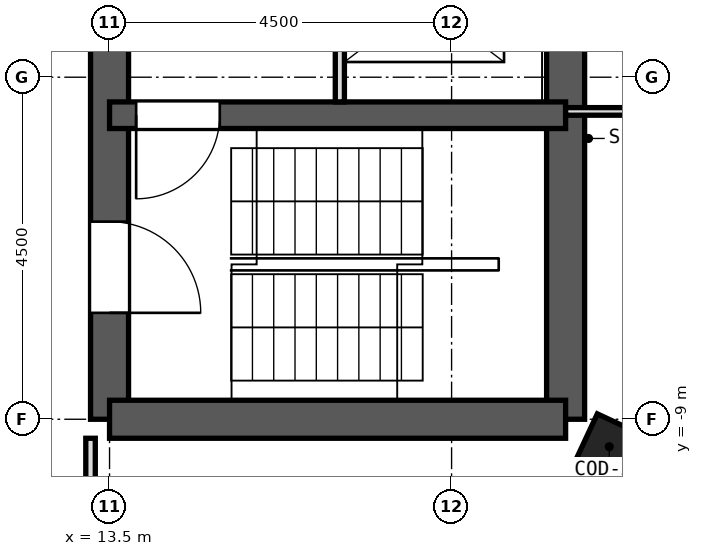
"""IFC4 building model, lengths in metres.
Left out: names, types, materials, properties, quantities, classifications, styles, units other than length and angle.
Written with IfcOpenShell. Run it as: python <this file> out.ifc"""

import sys

from ifc_helpers import new_model, si_unit, direction, frame, frame_2d, origin, origin_2d, place, context, subcontext, project, spatial, polyline, rectangle, outline, extrude, element, fill, save


model = new_model("IFC4")
c1 = context("Model", 3, precision=1e-05, world=origin(), true_north=direction((0.0, 1.0)))
c2 = subcontext(c1, "Body", "Model", "MODEL_VIEW")
j1 = project(units=[si_unit("LENGTHUNIT", "METRE"), si_unit("PLANEANGLEUNIT", "RADIAN")], contexts=[c1])
p1 = place(None, origin())
s1 = spatial("IfcSite", under=j1, at=p1, CompositionType="ELEMENT")
p2 = place(p1, origin())
s2 = spatial("IfcBuilding", under=s1, at=p2, CompositionType="ELEMENT")
p3 = place(p2, frame((0.0, 0.0, 229.7)))
s3 = spatial("IfcBuildingStorey", under=s2, at=p3, CompositionType="ELEMENT", Elevation=229.7)
p4 = place(p3, frame((20.075, -9.361, 0.0), z_axis=(0.0, 0.0, 1.0), x_axis=(0.906307787037, -0.422618261741, 0.0)))
e1 = element("IfcColumn", 1, at=p4, inside=s3, PredefinedType="COLUMN", context=c2, shape_type="SweptSolid", body=[
    extrude(rectangle(XDim=0.65, YDim=0.65, at=origin_2d()), origin(), (0.0, 0.0, 1.0), 3.3),
])
p5 = place(p3, frame((13.5, -9.0, 0.0), z_axis=(0.0, 0.0, 1.0), x_axis=(0.0, 1.0, 0.0)))
e2 = element("IfcWall", 2, at=p5, inside=s3, PredefinedType="SHEAR", context=c2, shape_type="SweptSolid", body=[
    extrude(rectangle(XDim=18.0, YDim=0.5, at=frame_2d((9.0, 0.0))), origin(), (0.0, 0.0, 1.0), 3.3),
])
p6 = place(p5, frame((15.4, 0.0, 0.0)))
e3 = element("IfcOpeningElement", 3, at=p6, cuts=e2, PredefinedType="OPENING", context=c2, shape_type="SweptSolid", body=[
    extrude(rectangle(XDim=1.2, YDim=2.1, at=frame_2d((0.6, 1.05))), frame((0.0, 0.262, 0.0), z_axis=(0.0, -1.0, 0.0), x_axis=(1.0, 0.0, 0.0)), (0.0, 0.0, 1.0), 0.524),
])
p7 = place(p5, frame((1.4, 0.0, 0.0)))
e4 = element("IfcOpeningElement", 4, at=p7, cuts=e2, PredefinedType="OPENING", context=c2, shape_type="SweptSolid", body=[
    extrude(rectangle(XDim=1.2, YDim=2.1, at=frame_2d((0.6, 1.05))), frame((0.0, 0.262, 0.0), z_axis=(0.0, -1.0, 0.0), x_axis=(1.0, 0.0, 0.0)), (0.0, 0.0, 1.0), 0.524),
])
p8 = place(p5, frame((7.5, 0.0, 0.0)))
e5 = element("IfcOpeningElement", 5, at=p8, cuts=e2, PredefinedType="OPENING", context=c2, shape_type="SweptSolid", body=[
    extrude(rectangle(XDim=3.0, YDim=2.4, at=frame_2d((1.5, 1.2))), frame((0.0, 0.262, 0.0), z_axis=(0.0, -1.0, 0.0), x_axis=(1.0, 0.0, 0.0)), (0.0, 0.0, 1.0), 0.524),
])
p9 = place(p3, frame((19.5, -9.0, 0.0), z_axis=(0.0, 0.0, 1.0), x_axis=(0.0, 1.0, 0.0)))
e6 = element("IfcWall", 6, at=p9, inside=s3, PredefinedType="SHEAR", context=c2, shape_type="SweptSolid", body=[
    extrude(rectangle(XDim=18.0, YDim=0.5, at=frame_2d((9.0, 0.0))), origin(), (0.0, 0.0, 1.0), 3.3),
])
p10 = place(p9, frame((9.45, 0.0, 0.0)))
e7 = element("IfcOpeningElement", 7, at=p10, cuts=e6, PredefinedType="OPENING", context=c2, shape_type="SweptSolid", body=[
    extrude(rectangle(XDim=0.9, YDim=2.1, at=frame_2d((0.45, 1.05))), frame((0.0, 0.262, 0.0), z_axis=(0.0, -1.0, 0.0), x_axis=(1.0, 0.0, 0.0)), (0.0, 0.0, 1.0), 0.524),
])
p11 = place(p9, frame((7.65, 0.0, 0.0)))
e8 = element("IfcOpeningElement", 8, at=p11, cuts=e6, PredefinedType="OPENING", context=c2, shape_type="SweptSolid", body=[
    extrude(rectangle(XDim=0.9, YDim=2.1, at=frame_2d((0.45, 1.05))), frame((0.0, 0.262, 0.0), z_axis=(0.0, -1.0, 0.0), x_axis=(1.0, 0.0, 0.0)), (0.0, 0.0, 1.0), 0.524),
])
p12 = place(p3, frame((13.5, -9.0, 0.0), z_axis=(0.0, 0.0, 1.0), x_axis=(1.0, 0.0, 0.0)))
e9 = element("IfcWall", 9, at=p12, inside=s3, PredefinedType="SHEAR", context=c2, shape_type="SweptSolid", body=[
    extrude(rectangle(XDim=6.0, YDim=0.5, at=frame_2d((3.0, 0.0))), origin(), (0.0, 0.0, 1.0), 3.3),
])
p13 = place(p3, frame((13.5, -5.0, 0.0), z_axis=(0.0, 0.0, 1.0), x_axis=(1.0, 0.0, 0.0)))
e10 = element("IfcWall", 10, at=p13, inside=s3, PredefinedType="SHEAR", context=c2, shape_type="SweptSolid", body=[
    extrude(rectangle(XDim=6.0, YDim=0.35, at=frame_2d((3.0, 0.0))), origin(), (0.0, 0.0, 1.0), 3.3),
])
p14 = place(p13, frame((0.35, 0.0, 0.0)))
e11 = element("IfcOpeningElement", 11, at=p14, cuts=e10, PredefinedType="OPENING", context=c2, shape_type="SweptSolid", body=[
    extrude(rectangle(XDim=1.1, YDim=2.1, at=frame_2d((0.55, 1.05))), frame((0.0, 0.187, 0.0), z_axis=(0.0, -1.0, 0.0), x_axis=(1.0, 0.0, 0.0)), (0.0, 0.0, 1.0), 0.374),
])
p15 = place(p3, frame((18.77, -12.714, 0.0), z_axis=(0.0, 0.0, 1.0), x_axis=(0.500014901547, 0.866016800201, 0.0)))
e12 = element("IfcWall", 12, at=p15, inside=s3, PredefinedType="SOLIDWALL", context=c2, shape_type="SweptSolid", body=[
    extrude(rectangle(XDim=3.252, YDim=0.6, at=frame_2d((1.626, 0.0))), origin(), (0.0, 0.0, 1.0), 2.9),
])
p16 = place(p15, frame((0.576, 0.0, 0.9)))
e13 = element("IfcOpeningElement", 13, at=p16, cuts=e12, PredefinedType="OPENING", context=c2, shape_type="SweptSolid", body=[
    extrude(rectangle(XDim=2.1, YDim=1.8, at=frame_2d((1.05, 0.9))), frame((0.0, 0.312, 0.0), z_axis=(0.0, -1.0, 0.0), x_axis=(1.0, 0.0, 0.0)), (0.0, 0.0, 1.0), 0.624),
])
p17 = place(p3, origin())
e14 = element("IfcWall", 14, at=p17, inside=s3, PredefinedType="SOLIDWALL", context=c2, shape_type="SweptSolid", body=[
    extrude(outline(polyline([(20.656, -10.048), (20.975, -9.364), (20.411, -9.159), (20.507, -9.204), (20.232, -9.793), (20.136, -9.748), (20.656, -10.048)])), origin(), (0.0, 0.0, 1.0), 2.9),
])
p18 = place(p3, frame((13.25, -13.188, 0.0), z_axis=(0.0, 0.0, 1.0), x_axis=(0.0, 1.0, 0.0)))
e15 = element("IfcWall", 15, at=p18, inside=s3, PredefinedType="PARTITIONING", context=c2, shape_type="SweptSolid", body=[
    extrude(rectangle(XDim=3.938, YDim=0.125, at=frame_2d((1.969, 0.0))), origin(), (0.0, 0.0, 1.0), 2.9),
])
p19 = place(p3, frame((19.5, -4.95, 0.0), z_axis=(0.0, 0.0, 1.0), x_axis=(1.0, 0.0, 0.0)))
e16 = element("IfcWall", 16, at=p19, inside=s3, PredefinedType="PARTITIONING", context=c2, shape_type="SweptSolid", body=[
    extrude(rectangle(XDim=2.284, YDim=0.1, at=frame_2d((1.142, 0.0))), origin(), (0.0, 0.0, 1.0), 2.9),
])
p20 = place(p3, frame((16.53, -4.825, 0.0), z_axis=(0.0, 0.0, 1.0), x_axis=(0.0, 1.0, 0.0)))
e17 = element("IfcWall", 17, at=p20, inside=s3, PredefinedType="PARTITIONING", context=c2, shape_type="SweptSolid", body=[
    extrude(rectangle(XDim=2.65, YDim=0.12, at=frame_2d((1.325, 0.0))), origin(), (0.0, 0.0, 1.0), 2.9),
])
p21 = place(p20, frame((0.775, 0.0, 0.0)))
e18 = element("IfcOpeningElement", 18, at=p21, cuts=e17, PredefinedType="OPENING", context=c2, shape_type="SweptSolid", body=[
    extrude(rectangle(XDim=1.1, YDim=2.1, at=frame_2d((0.55, 1.05))), frame((0.0, 0.072, 0.0), z_axis=(0.0, -1.0, 0.0), x_axis=(1.0, 0.0, 0.0)), (0.0, 0.0, 1.0), 0.144),
])
p22 = place(p14, frame((1.1, 0.0, 0.0), z_axis=(0.0, 0.0, 1.0), x_axis=(-1.0, 0.0, 0.0)))
e19 = element("IfcDoor", 19, at=p22, inside=s3, OperationType="SINGLE_SWING_RIGHT", PredefinedType="DOOR", context=c2, shape_type="SweptSolid", body=[
    extrude(rectangle(XDim=1.1, YDim=2.1, at=frame_2d((0.55, 1.05))), frame((0.0, 0.025, 0.0), z_axis=(0.0, -1.0, 0.0), x_axis=(1.0, 0.0, 0.0)), (0.0, 0.0, 1.0), 0.05),
])
fill(e11, e19)
p23 = place(p7, frame((1.2, 0.0, 0.0), z_axis=(0.0, 0.0, 1.0), x_axis=(-1.0, 0.0, 0.0)))
e20 = element("IfcDoor", 20, at=p23, inside=s3, OperationType="SINGLE_SWING_RIGHT", PredefinedType="DOOR", context=c2, shape_type="SweptSolid", body=[
    extrude(rectangle(XDim=1.2, YDim=2.1, at=frame_2d((0.6, 1.05))), frame((0.0, 0.025, 0.0), z_axis=(0.0, -1.0, 0.0), x_axis=(1.0, 0.0, 0.0)), (0.0, 0.0, 1.0), 0.05),
])
fill(e4, e20)
save(model, sys.argv[1])
